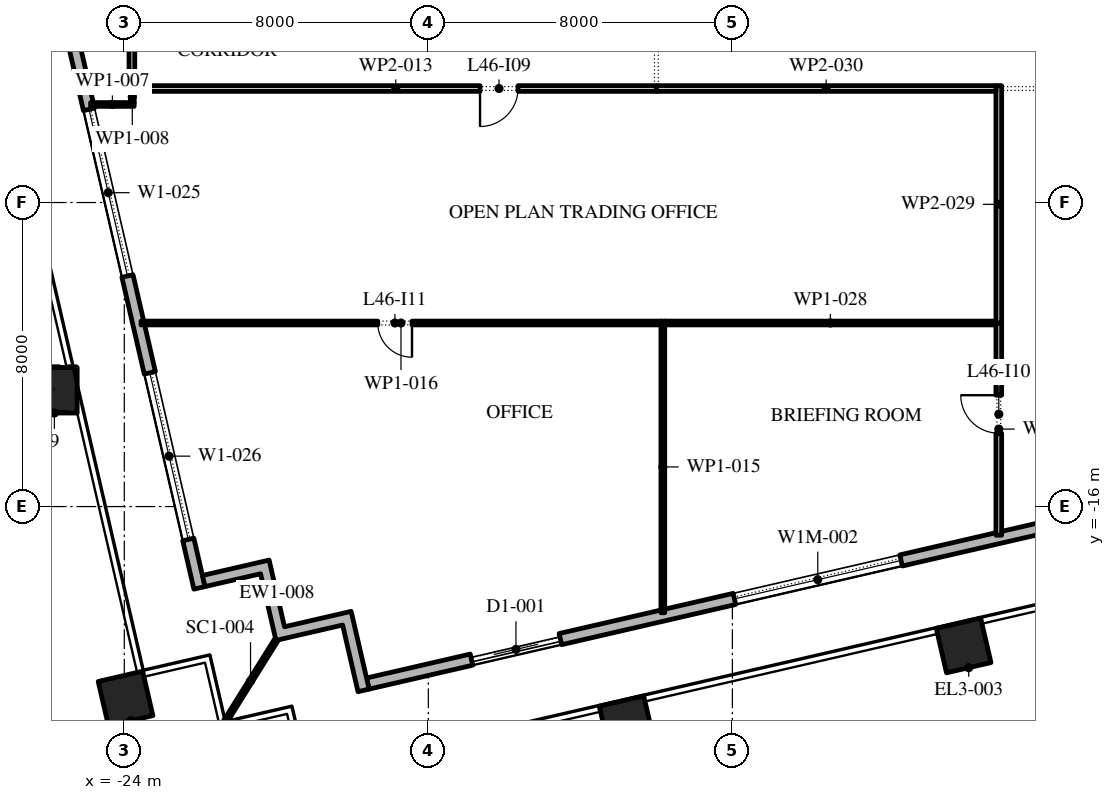
"""IFC4 building model, lengths in metres.
Left out: names, types, materials, properties, quantities, classifications, styles, units other than length and angle.
Written with IfcOpenShell. Run it as: python <this file> out.ifc"""

import sys

from ifc_helpers import new_model, si_unit, direction, frame, frame_2d, origin, origin_2d, place, context, subcontext, project, spatial, polyline, rectangle, outline, extrude, element, fill, save


model = new_model("IFC4")
c1 = context("Model", 3, precision=1e-05, world=origin(), true_north=direction((0.0, 1.0)))
c2 = subcontext(c1, "Body", "Model", "MODEL_VIEW")
j1 = project(units=[si_unit("LENGTHUNIT", "METRE"), si_unit("PLANEANGLEUNIT", "RADIAN")], contexts=[c1])
p1 = place(None, origin())
s1 = spatial("IfcSite", under=j1, at=p1, CompositionType="ELEMENT")
p2 = place(p1, origin())
s2 = spatial("IfcBuilding", under=s1, at=p2, CompositionType="ELEMENT")
p3 = place(p2, frame((0.0, 0.0, 209.4)))
s3 = spatial("IfcBuildingStorey", under=s2, at=p3, CompositionType="ELEMENT", Elevation=209.4)
for number, where, z_axis, x_axis in (
    (1, (-10.782, -21.702, 0.0), (0.0, 0.0, 1.0), (0.974, 0.225, 0.0)),
    (2, (-1.916, -19.655, 0.0), (0.0, 0.0, 1.0), (0.974, 0.225, 0.0)),
):
    element("IfcColumn", number, at=place(p3, frame(where, z_axis=z_axis, x_axis=x_axis)), inside=s3, PredefinedType="COLUMN", context=c2, shape_type="SweptSolid", body=[
        extrude(rectangle(XDim=1.2, YDim=1.2, at=origin_2d()), origin(), (0.0, 0.0, 1.0), 4.2),
    ])
p4 = place(p3, frame((-25.84, -12.939, 0.0), z_axis=(-0.002673602948, 0.011740604248, 0.999927502402), x_axis=(-0.975037935076, -0.222038341651, 0.0)))
e3 = element("IfcColumn", 3, at=p4, inside=s3, PredefinedType="COLUMN", context=c2, shape_type="SweptSolid", body=[
    extrude(rectangle(XDim=1.2, YDim=1.2, at=origin_2d()), origin(), (0.0, 0.0, 1.0), 4.2),
])
p5 = place(p3, frame((-23.967, -21.051, 0.0), z_axis=(0.0, 0.0, 1.0), x_axis=(0.974370064785, 0.224951054344, 0.0)))
e4 = element("IfcColumn", 4, at=p5, inside=s3, PredefinedType="COLUMN", context=c2, shape_type="SweptSolid", body=[
    extrude(rectangle(XDim=1.2, YDim=1.2, at=origin_2d()), origin(), (0.0, 0.0, 1.0), 4.2),
])
p6 = place(p3, frame((-17.592, -20.657, 0.0), z_axis=(0.0, 0.0, 1.0), x_axis=(0.974370243697, 0.224950279389, 0.0)))
e5 = element("IfcWall", 5, at=p6, inside=s3, PredefinedType="STANDARD", context=c2, shape_type="SweptSolid", body=[
    extrude(rectangle(XDim=49.5, YDim=0.3, at=frame_2d((24.75, 0.0))), origin(), (0.0, 0.0, 1.0), 4.0),
])
p7 = place(p6, frame((2.8, 0.0, 0.0)))
e6 = element("IfcOpeningElement", 6, at=p7, cuts=e5, PredefinedType="OPENING", context=c2, shape_type="SweptSolid", body=[
    extrude(rectangle(XDim=2.4, YDim=3.5, at=frame_2d((1.2, 1.75))), frame((0.0, 0.16, 0.0), z_axis=(0.0, -1.0, 0.0), x_axis=(1.0, 0.0, 0.0)), (0.0, 0.0, 1.0), 0.32),
])
p8 = place(p6, frame((9.9, 0.0, 0.45)))
e7 = element("IfcOpeningElement", 7, at=p8, cuts=e5, PredefinedType="OPENING", context=c2, shape_type="SweptSolid", body=[
    extrude(rectangle(XDim=4.5, YDim=2.575, at=frame_2d((2.25, 1.288))), frame((0.0, 0.16, 0.0), z_axis=(0.0, -1.0, 0.0), x_axis=(1.0, 0.0, 0.0)), (0.0, 0.0, 1.0), 0.32),
])
p9 = place(p6, frame((18.2, 0.0, 0.45)))
e8 = element("IfcOpeningElement", 8, at=p9, cuts=e5, PredefinedType="OPENING", context=c2, shape_type="SweptSolid", body=[
    extrude(rectangle(XDim=4.5, YDim=3.05, at=frame_2d((2.25, 1.525))), frame((0.0, 0.16, 0.0), z_axis=(0.0, -1.0, 0.0), x_axis=(1.0, 0.0, 0.0)), (0.0, 0.0, 1.0), 0.32),
])
p10 = place(p6, frame((26.5, 0.0, 0.45)))
e9 = element("IfcOpeningElement", 9, at=p10, cuts=e5, PredefinedType="OPENING", context=c2, shape_type="SweptSolid", body=[
    extrude(rectangle(XDim=4.5, YDim=2.75, at=frame_2d((2.25, 1.375))), frame((0.0, 0.16, 0.0), z_axis=(0.0, -1.0, 0.0), x_axis=(1.0, 0.0, 0.0)), (0.0, 0.0, 1.0), 0.32),
])
p11 = place(p6, frame((36.8, 0.0, 0.0)))
e10 = element("IfcOpeningElement", 10, at=p11, cuts=e5, PredefinedType="OPENING", context=c2, shape_type="SweptSolid", body=[
    extrude(rectangle(XDim=2.4, YDim=3.275, at=frame_2d((1.2, 1.637))), frame((0.0, 0.16, 0.0), z_axis=(0.0, -1.0, 0.0), x_axis=(1.0, 0.0, 0.0)), (0.0, 0.0, 1.0), 0.32),
])
p12 = place(p6, frame((43.1, 0.0, 0.45)))
e11 = element("IfcOpeningElement", 11, at=p12, cuts=e5, PredefinedType="OPENING", context=c2, shape_type="SweptSolid", body=[
    extrude(rectangle(XDim=4.5, YDim=2.875, at=frame_2d((2.25, 1.438))), frame((0.0, 0.16, 0.0), z_axis=(0.0, -1.0, 0.0), x_axis=(1.0, 0.0, 0.0)), (0.0, 0.0, 1.0), 0.32),
])
p13 = place(p3, frame((-33.157, 30.092, 0.0), z_axis=(0.0, 0.0, 1.0), x_axis=(0.224950279389, -0.974370243697, 0.0)))
e12 = element("IfcWall", 12, at=p13, inside=s3, PredefinedType="STANDARD", context=c2, shape_type="SweptSolid", body=[
    extrude(rectangle(XDim=49.5, YDim=0.3, at=frame_2d((24.75, 0.0))), origin(), (0.0, 0.0, 1.0), 4.0),
])
p14 = place(p13, frame((2.207, 0.0, 0.0)))
e13 = element("IfcOpeningElement", 13, at=p14, cuts=e12, PredefinedType="OPENING", context=c2, shape_type="SweptSolid", body=[
    extrude(rectangle(XDim=2.4, YDim=3.5, at=frame_2d((1.2, 1.75))), frame((0.0, 0.16, 0.0), z_axis=(0.0, -1.0, 0.0), x_axis=(1.0, 0.0, 0.0)), (0.0, 0.0, 1.0), 0.32),
])
p15 = place(p13, frame((8.121, 0.0, 0.45)))
e14 = element("IfcOpeningElement", 14, at=p15, cuts=e12, PredefinedType="OPENING", context=c2, shape_type="SweptSolid", body=[
    extrude(rectangle(XDim=4.5, YDim=2.825, at=frame_2d((2.25, 1.413))), frame((0.0, 0.16, 0.0), z_axis=(0.0, -1.0, 0.0), x_axis=(1.0, 0.0, 0.0)), (0.0, 0.0, 1.0), 0.32),
])
p16 = place(p13, frame((15.236, 0.0, 0.45)))
e15 = element("IfcOpeningElement", 15, at=p16, cuts=e12, PredefinedType="OPENING", context=c2, shape_type="SweptSolid", body=[
    extrude(rectangle(XDim=4.5, YDim=2.95, at=frame_2d((2.25, 1.475))), frame((0.0, 0.16, 0.0), z_axis=(0.0, -1.0, 0.0), x_axis=(1.0, 0.0, 0.0)), (0.0, 0.0, 1.0), 0.32),
])
p17 = place(p13, frame((22.35, 0.0, 0.45)))
e16 = element("IfcOpeningElement", 16, at=p17, cuts=e12, PredefinedType="OPENING", context=c2, shape_type="SweptSolid", body=[
    extrude(rectangle(XDim=4.5, YDim=3.0, at=frame_2d((2.25, 1.5))), frame((0.0, 0.16, 0.0), z_axis=(0.0, -1.0, 0.0), x_axis=(1.0, 0.0, 0.0)), (0.0, 0.0, 1.0), 0.32),
])
p18 = place(p13, frame((30.514, 0.0, 0.0)))
e17 = element("IfcOpeningElement", 17, at=p18, cuts=e12, PredefinedType="OPENING", context=c2, shape_type="SweptSolid", body=[
    extrude(rectangle(XDim=2.4, YDim=3.5, at=frame_2d((1.2, 1.75))), frame((0.0, 0.16, 0.0), z_axis=(0.0, -1.0, 0.0), x_axis=(1.0, 0.0, 0.0)), (0.0, 0.0, 1.0), 0.32),
])
p19 = place(p13, frame((36.579, 0.0, 0.45)))
e18 = element("IfcOpeningElement", 18, at=p19, cuts=e12, PredefinedType="OPENING", context=c2, shape_type="SweptSolid", body=[
    extrude(rectangle(XDim=4.5, YDim=3.05, at=frame_2d((2.25, 1.525))), frame((0.0, 0.16, 0.0), z_axis=(0.0, -1.0, 0.0), x_axis=(1.0, 0.0, 0.0)), (0.0, 0.0, 1.0), 0.32),
])
p20 = place(p13, frame((43.693, 0.0, 0.45)))
e19 = element("IfcOpeningElement", 19, at=p20, cuts=e12, PredefinedType="OPENING", context=c2, shape_type="SweptSolid", body=[
    extrude(rectangle(XDim=4.5, YDim=3.05, at=frame_2d((2.25, 1.525))), frame((0.0, 0.16, 0.0), z_axis=(0.0, -1.0, 0.0), x_axis=(1.0, 0.0, 0.0)), (0.0, 0.0, 1.0), 0.32),
])
p21 = place(p3, origin())
e20 = element("IfcWall", 20, at=p21, inside=s3, PredefinedType="STANDARD", context=c2, shape_type="SweptSolid", body=[
    extrude(outline(polyline([(-18.256, -19.117), (-20.01, -19.522), (-20.414, -17.768), (-21.876, -18.105), (-21.943, -17.813), (-20.19, -17.408), (-19.785, -19.162), (-18.031, -18.757), (-17.558, -20.803), (-17.851, -20.871), (-18.256, -19.117)])), origin(), (0.0, 0.0, 1.0), 4.0),
])
p22 = place(p3, frame((-20.01, -19.522, -0.05), z_axis=(0.0, 0.0, 1.0), x_axis=(-0.529920736377, -0.848047176257, 0.0)))
e21 = element("IfcWall", 21, at=p22, inside=s3, PredefinedType="STANDARD", context=c2, shape_type="SweptSolid", body=[
    extrude(rectangle(XDim=2.526, YDim=0.1, at=frame_2d((1.263, 0.0))), origin(), (0.0, 0.0, 1.0), 4.05),
])
p23 = place(p3, frame((-23.8, -5.075, 0.0), z_axis=(0.0, 0.0, 1.0), x_axis=(0.0, 1.0, 0.0)))
e22 = element("IfcWall", 22, at=p23, inside=s3, PredefinedType="PARTITIONING", context=c2, shape_type="SweptSolid", body=[
    extrude(rectangle(XDim=13.525, YDim=0.15, at=frame_2d((6.762, 0.0))), origin(), (0.0, 0.0, 1.0), 4.0),
])
p24 = place(p23, frame((7.625, 0.0, 0.0)))
e23 = element("IfcOpeningElement", 23, at=p24, cuts=e22, PredefinedType="OPENING", context=c2, shape_type="SweptSolid", body=[
    extrude(rectangle(XDim=1.0, YDim=2.1, at=frame_2d((0.5, 1.05))), frame((0.0, 0.085, 0.0), z_axis=(0.0, -1.0, 0.0), x_axis=(1.0, 0.0, 0.0)), (0.0, 0.0, 1.0), 0.17),
])
p25 = place(p3, frame((-23.74, -5.42, 0.0), z_axis=(0.0, 0.0, 1.0), x_axis=(-1.0, 0.0, 0.0)))
e24 = element("IfcWall", 24, at=p25, inside=s3, PredefinedType="PARTITIONING", context=c2, shape_type="SweptSolid", body=[
    extrude(rectangle(XDim=1.147, YDim=0.1, at=frame_2d((0.573, 0.0))), origin(), (0.0, 0.0, 1.0), 4.0),
])
p26 = place(p3, frame((-23.79, -5.075, 0.0), z_axis=(0.0, 0.0, 1.0), x_axis=(0.0, -1.0, 0.0)))
e25 = element("IfcWall", 25, at=p26, inside=s3, PredefinedType="PARTITIONING", context=c2, shape_type="SweptSolid", body=[
    extrude(rectangle(XDim=0.295, YDim=0.1, at=frame_2d((0.147, 0.0))), origin(), (0.0, 0.0, 1.0), 4.0),
])
p27 = place(p3, frame((-10.0, -5.0, 0.0), z_axis=(0.0, 0.0, 1.0), x_axis=(-1.0, 0.0, 0.0)))
e26 = element("IfcWall", 26, at=p27, inside=s3, PredefinedType="PARTITIONING", context=c2, shape_type="SweptSolid", body=[
    extrude(rectangle(XDim=13.715, YDim=0.15, at=frame_2d((6.857, 0.0))), origin(), (0.0, 0.0, 1.0), 4.0),
])
p28 = place(p27, frame((3.64, 0.0, 0.0)))
e27 = element("IfcOpeningElement", 27, at=p28, cuts=e26, PredefinedType="OPENING", context=c2, shape_type="SweptSolid", body=[
    extrude(rectangle(XDim=1.0, YDim=2.1, at=frame_2d((0.5, 1.05))), frame((0.0, 0.085, 0.0), z_axis=(0.0, -1.0, 0.0), x_axis=(1.0, 0.0, 0.0)), (0.0, 0.0, 1.0), 0.17),
])
p29 = place(p3, frame((-9.83, -18.794, 0.0), z_axis=(0.0, 0.0, 1.0), x_axis=(0.0, 1.0, 0.0)))
e28 = element("IfcWall", 28, at=p29, inside=s3, PredefinedType="PARTITIONING", context=c2, shape_type="SweptSolid", body=[
    extrude(rectangle(XDim=7.674, YDim=0.1, at=frame_2d((3.837, 0.0))), origin(), (0.0, 0.0, 1.0), 4.0),
])
p30 = place(p3, frame((-9.88, -11.17, 0.0), z_axis=(0.0, 0.0, 1.0), x_axis=(-1.0, 0.0, 0.0)))
e29 = element("IfcWall", 29, at=p30, inside=s3, PredefinedType="PARTITIONING", context=c2, shape_type="SweptSolid", body=[
    extrude(rectangle(XDim=13.68, YDim=0.1, at=frame_2d((6.84, 0.0))), origin(), (0.0, 0.0, 1.0), 4.0),
])
p31 = place(p30, frame((6.55, 0.0, 0.0)))
e30 = element("IfcOpeningElement", 30, at=p31, cuts=e29, PredefinedType="OPENING", context=c2, shape_type="SweptSolid", body=[
    extrude(rectangle(XDim=0.9, YDim=2.1, at=frame_2d((0.45, 1.05))), frame((0.0, 0.06, 0.0), z_axis=(0.0, -1.0, 0.0), x_axis=(1.0, 0.0, 0.0)), (0.0, 0.0, 1.0), 0.12),
])
p32 = place(p3, frame((-0.99, -16.753, 0.0), z_axis=(0.0, 0.0, 1.0), x_axis=(0.0, 1.0, 0.0)))
e31 = element("IfcWall", 31, at=p32, inside=s3, PredefinedType="PARTITIONING", context=c2, shape_type="SweptSolid", body=[
    extrude(rectangle(XDim=5.583, YDim=0.15, at=frame_2d((2.792, 0.0))), origin(), (0.0, 0.0, 1.0), 4.0),
])
p33 = place(p32, frame((2.683, 0.0, 0.0)))
e32 = element("IfcOpeningElement", 32, at=p33, cuts=e31, PredefinedType="OPENING", context=c2, shape_type="SweptSolid", body=[
    extrude(rectangle(XDim=1.0, YDim=2.1, at=frame_2d((0.5, 1.05))), frame((0.0, 0.085, 0.0), z_axis=(0.0, -1.0, 0.0), x_axis=(1.0, 0.0, 0.0)), (0.0, 0.0, 1.0), 0.17),
])
p34 = place(p3, frame((-1.065, -11.17, 0.0), z_axis=(0.0, 0.0, 1.0), x_axis=(-1.0, 0.0, 0.0)))
e33 = element("IfcWall", 33, at=p34, inside=s3, PredefinedType="PARTITIONING", context=c2, shape_type="SweptSolid", body=[
    extrude(rectangle(XDim=8.715, YDim=0.1, at=frame_2d((4.357, 0.0))), origin(), (0.0, 0.0, 1.0), 4.0),
])
p35 = place(p3, frame((-0.99, -11.17, 0.0), z_axis=(0.0, 0.0, 1.0), x_axis=(0.0, 1.0, 0.0)))
e34 = element("IfcWall", 34, at=p35, inside=s3, PredefinedType="PARTITIONING", context=c2, shape_type="SweptSolid", body=[
    extrude(rectangle(XDim=6.245, YDim=0.15, at=frame_2d((3.123, 0.0))), origin(), (0.0, 0.0, 1.0), 4.0),
])
p36 = place(p3, frame((-1.065, -5.0, 0.0), z_axis=(0.0, 0.0, 1.0), x_axis=(-1.0, 0.0, 0.0)))
e35 = element("IfcWall", 35, at=p36, inside=s3, PredefinedType="PARTITIONING", context=c2, shape_type="SweptSolid", body=[
    extrude(rectangle(XDim=8.935, YDim=0.15, at=frame_2d((4.468, 0.0))), origin(), (0.0, 0.0, 1.0), 4.0),
])
p37 = place(p7, origin())
e36 = element("IfcDoor", 36, at=p37, inside=s3, OperationType="DOUBLE_DOOR_SLIDING", PredefinedType="DOOR", context=c2, shape_type="SweptSolid", body=[
    extrude(rectangle(XDim=2.4, YDim=3.5, at=frame_2d((1.2, 1.75))), frame((0.0, 0.025, 0.0), z_axis=(0.0, -1.0, 0.0), x_axis=(1.0, 0.0, 0.0)), (0.0, 0.0, 1.0), 0.05),
])
fill(e6, e36)
p38 = place(p8, origin())
e37 = element("IfcWindow", 37, at=p38, inside=s3, PartitioningType="DOUBLE_PANEL_VERTICAL", PredefinedType="WINDOW", context=c2, shape_type="SweptSolid", body=[
    extrude(rectangle(XDim=4.5, YDim=2.575, at=frame_2d((2.25, 1.288))), frame((0.0, 0.03, 0.0), z_axis=(0.0, -1.0, 0.0), x_axis=(1.0, 0.0, 0.0)), (0.0, 0.0, 1.0), 0.06),
])
fill(e7, e37)
p39 = place(p19, origin())
e38 = element("IfcWindow", 38, at=p39, inside=s3, PartitioningType="DOUBLE_PANEL_VERTICAL", PredefinedType="WINDOW", context=c2, shape_type="SweptSolid", body=[
    extrude(rectangle(XDim=4.5, YDim=3.05, at=frame_2d((2.25, 1.525))), frame((0.0, 0.03, 0.0), z_axis=(0.0, -1.0, 0.0), x_axis=(1.0, 0.0, 0.0)), (0.0, 0.0, 1.0), 0.06),
])
fill(e18, e38)
p40 = place(p20, origin())
e39 = element("IfcWindow", 39, at=p40, inside=s3, PartitioningType="DOUBLE_PANEL_VERTICAL", PredefinedType="WINDOW", context=c2, shape_type="SweptSolid", body=[
    extrude(rectangle(XDim=4.5, YDim=3.05, at=frame_2d((2.25, 1.525))), frame((0.0, 0.03, 0.0), z_axis=(0.0, -1.0, 0.0), x_axis=(1.0, 0.0, 0.0)), (0.0, 0.0, 1.0), 0.06),
])
fill(e19, e39)
p41 = place(p28, origin())
e40 = element("IfcDoor", 40, at=p41, inside=s3, OperationType="SINGLE_SWING_LEFT", PredefinedType="DOOR", context=c2, shape_type="SweptSolid", body=[
    extrude(rectangle(XDim=1.0, YDim=2.1, at=frame_2d((0.5, 1.05))), frame((0.0, 0.025, 0.0), z_axis=(0.0, -1.0, 0.0), x_axis=(1.0, 0.0, 0.0)), (0.0, 0.0, 1.0), 0.05),
])
fill(e27, e40)
p42 = place(p33, origin())
e41 = element("IfcDoor", 41, at=p42, inside=s3, OperationType="SINGLE_SWING_LEFT", PredefinedType="DOOR", context=c2, shape_type="SweptSolid", body=[
    extrude(rectangle(XDim=1.0, YDim=2.1, at=frame_2d((0.5, 1.05))), frame((0.0, 0.025, 0.0), z_axis=(0.0, -1.0, 0.0), x_axis=(1.0, 0.0, 0.0)), (0.0, 0.0, 1.0), 0.05),
])
fill(e32, e41)
p43 = place(p31, origin())
e42 = element("IfcDoor", 42, at=p43, inside=s3, OperationType="SINGLE_SWING_RIGHT", PredefinedType="DOOR", context=c2, shape_type="SweptSolid", body=[
    extrude(rectangle(XDim=0.9, YDim=2.1, at=frame_2d((0.45, 1.05))), frame((0.0, 0.025, 0.0), z_axis=(0.0, -1.0, 0.0), x_axis=(1.0, 0.0, 0.0)), (0.0, 0.0, 1.0), 0.05),
])
fill(e30, e42)
save(model, sys.argv[1])
